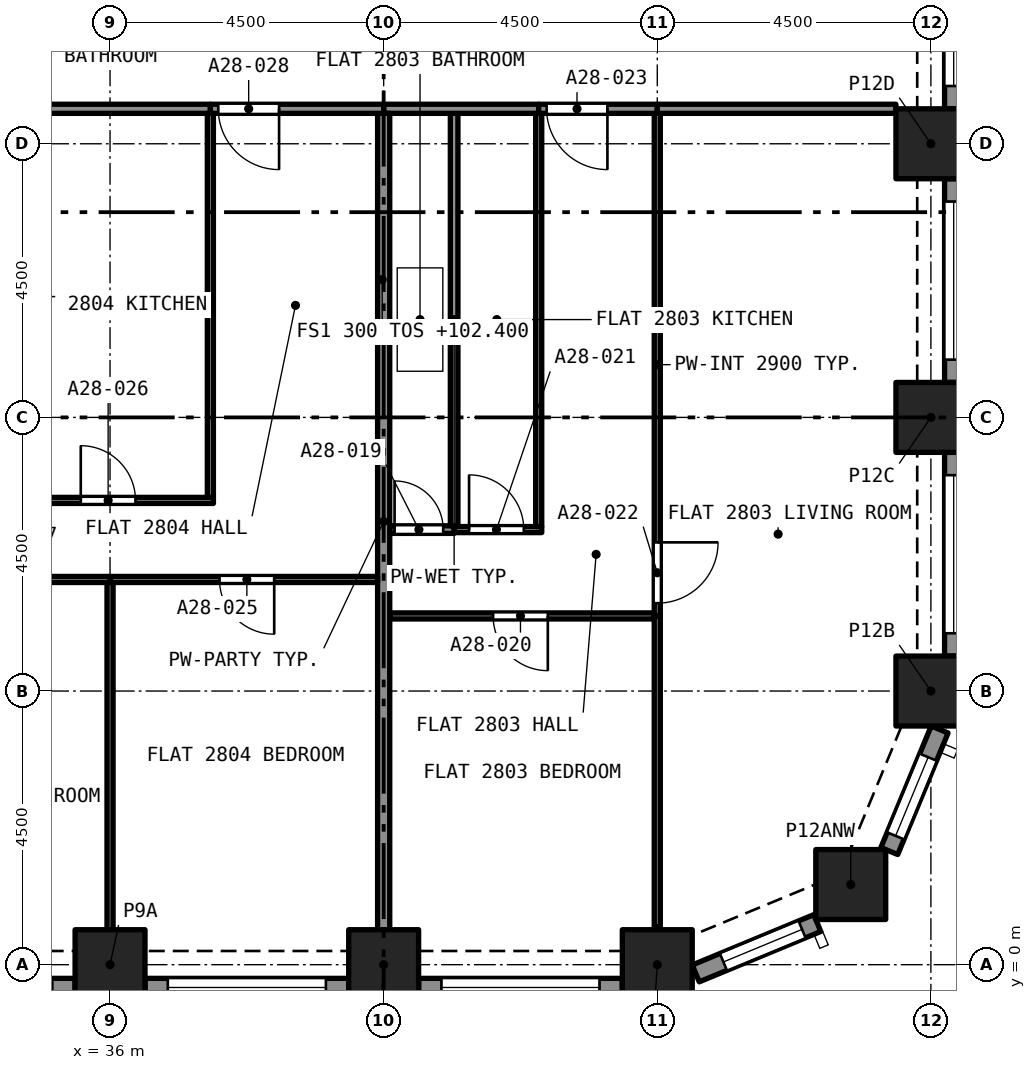
"""IFC4 building model, lengths in metres.
Left out: names, types, materials, properties, quantities, classifications, styles, units other than length and angle.
Written with IfcOpenShell. Run it as: python <this file> out.ifc"""

import sys

from ifc_helpers import new_model, si_unit, direction, frame, frame_2d, origin, origin_2d, place, context, subcontext, project, spatial, rectangle, extrude, element, fill, save


model = new_model("IFC4")
c1 = context("Model", 3, precision=1e-05, world=origin(), true_north=direction((0.0, 1.0)))
c2 = subcontext(c1, "Body", "Model", "MODEL_VIEW")
j1 = project(units=[si_unit("LENGTHUNIT", "METRE"), si_unit("PLANEANGLEUNIT", "RADIAN")], contexts=[c1])
p1 = place(None, origin())
s1 = spatial("IfcSite", under=j1, at=p1, CompositionType="ELEMENT")
p2 = place(p1, origin())
s2 = spatial("IfcBuilding", under=s1, at=p2, CompositionType="ELEMENT")
p3 = place(p2, frame((0.0, 0.0, 102.4)))
s3 = spatial("IfcBuildingStorey", under=s2, at=p3, CompositionType="ELEMENT", Elevation=102.4)
for number, where, z_axis, x_axis in (
    (1, (36.0, 0.0, 0.0), (0.0, 0.0, 1.0), (1.0, 0.0, 0.0)),
    (2, (40.5, 0.0, 0.0), (0.0, 0.0, 1.0), (1.0, 0.0, 0.0)),
    (3, (45.0, 0.0, 0.0), (0.0, 0.0, 1.0), (1.0, 0.0, 0.0)),
    (4, (48.182, 1.318, 0.0), (0.0, 0.0, 1.0), (1.0, 0.0, 0.0)),
    (5, (49.5, 4.5, 0.0), (0.0, 0.0, 1.0), (1.0, 0.0, 0.0)),
    (6, (49.5, 9.0, 0.0), (0.0, 0.0, 1.0), (1.0, 0.0, 0.0)),
    (7, (49.5, 13.5, 0.0), (0.0, 0.0, 1.0), (1.0, 0.0, 0.0)),
):
    element("IfcColumn", number, at=place(p3, frame(where, z_axis=z_axis, x_axis=x_axis)), inside=s3, PredefinedType="COLUMN", context=c2, shape_type="SweptSolid", body=[
        extrude(rectangle(XDim=1.15, YDim=1.15, at=origin_2d()), origin(), (0.0, 0.0, 1.0), 3.2),
    ])
p4 = place(p3, frame((35.425, -0.375, 0.0), z_axis=(0.0, 0.0, 1.0), x_axis=(-1.0, 0.0, 0.0)))
e8 = element("IfcWall", 8, at=p4, inside=s3, PredefinedType="SOLIDWALL", context=c2, shape_type="SweptSolid", body=[
    extrude(rectangle(XDim=3.35, YDim=0.3, at=frame_2d((1.675, 0.0))), origin(), (0.0, 0.0, 1.0), 3.2),
])
p5 = place(p4, frame((0.375, 0.0, 0.45)))
e9 = element("IfcOpeningElement", 9, at=p5, cuts=e8, PredefinedType="OPENING", context=c2, shape_type="SweptSolid", body=[
    extrude(rectangle(XDim=2.6, YDim=1.95, at=frame_2d((1.3, 0.975))), frame((0.0, 0.16, 0.0), z_axis=(0.0, -1.0, 0.0), x_axis=(1.0, 0.0, 0.0)), (0.0, 0.0, 1.0), 0.32),
])
p6 = place(p3, frame((39.925, -0.375, 0.0), z_axis=(0.0, 0.0, 1.0), x_axis=(-1.0, 0.0, 0.0)))
e10 = element("IfcWall", 10, at=p6, inside=s3, PredefinedType="SOLIDWALL", context=c2, shape_type="SweptSolid", body=[
    extrude(rectangle(XDim=3.35, YDim=0.3, at=frame_2d((1.675, 0.0))), origin(), (0.0, 0.0, 1.0), 3.2),
])
p7 = place(p6, frame((0.375, 0.0, 0.45)))
e11 = element("IfcOpeningElement", 11, at=p7, cuts=e10, PredefinedType="OPENING", context=c2, shape_type="SweptSolid", body=[
    extrude(rectangle(XDim=2.6, YDim=1.95, at=frame_2d((1.3, 0.975))), frame((0.0, 0.16, 0.0), z_axis=(0.0, -1.0, 0.0), x_axis=(1.0, 0.0, 0.0)), (0.0, 0.0, 1.0), 0.32),
])
p8 = place(p3, frame((44.425, -0.375, 0.0), z_axis=(0.0, 0.0, 1.0), x_axis=(-1.0, 0.0, 0.0)))
e12 = element("IfcWall", 12, at=p8, inside=s3, PredefinedType="SOLIDWALL", context=c2, shape_type="SweptSolid", body=[
    extrude(rectangle(XDim=3.35, YDim=0.3, at=frame_2d((1.675, 0.0))), origin(), (0.0, 0.0, 1.0), 3.2),
])
p9 = place(p8, frame((0.375, 0.0, 0.45)))
e13 = element("IfcOpeningElement", 13, at=p9, cuts=e12, PredefinedType="OPENING", context=c2, shape_type="SweptSolid", body=[
    extrude(rectangle(XDim=2.6, YDim=1.95, at=frame_2d((1.3, 0.975))), frame((0.0, 0.16, 0.0), z_axis=(0.0, -1.0, 0.0), x_axis=(1.0, 0.0, 0.0)), (0.0, 0.0, 1.0), 0.32),
])
p10 = place(p3, frame((47.631, 0.684, 0.0), z_axis=(0.0, 0.0, 1.0), x_axis=(-0.923862802911, -0.382723818695, 0.0)))
e14 = element("IfcWall", 14, at=p10, inside=s3, PredefinedType="SOLIDWALL", context=c2, shape_type="SweptSolid", body=[
    extrude(rectangle(XDim=2.164, YDim=0.3, at=frame_2d((1.082, 0.0))), origin(), (0.0, 0.0, 1.0), 3.2),
])
p11 = place(p10, frame((0.271, 0.0, 0.45)))
e15 = element("IfcOpeningElement", 15, at=p11, cuts=e14, PredefinedType="OPENING", context=c2, shape_type="SweptSolid", body=[
    extrude(rectangle(XDim=1.4, YDim=1.95, at=frame_2d((0.7, 0.975))), frame((0.0, 0.16, 0.0), z_axis=(0.0, -1.0, 0.0), x_axis=(1.0, 0.0, 0.0)), (0.0, 0.0, 1.0), 0.32),
])
p12 = place(p3, frame((49.644, 3.868, 0.0), z_axis=(0.0, 0.0, 1.0), x_axis=(-0.382723818695, -0.923862802911, 0.0)))
e16 = element("IfcWall", 16, at=p12, inside=s3, PredefinedType="SOLIDWALL", context=c2, shape_type="SweptSolid", body=[
    extrude(rectangle(XDim=2.164, YDim=0.3, at=frame_2d((1.082, 0.0))), origin(), (0.0, 0.0, 1.0), 3.2),
])
p13 = place(p12, frame((0.493, 0.0, 0.45)))
e17 = element("IfcOpeningElement", 17, at=p13, cuts=e16, PredefinedType="OPENING", context=c2, shape_type="SweptSolid", body=[
    extrude(rectangle(XDim=1.4, YDim=1.95, at=frame_2d((0.7, 0.975))), frame((0.0, 0.16, 0.0), z_axis=(0.0, -1.0, 0.0), x_axis=(1.0, 0.0, 0.0)), (0.0, 0.0, 1.0), 0.32),
])
p14 = place(p3, frame((49.875, 8.425, 0.0), z_axis=(0.0, 0.0, 1.0), x_axis=(0.0, -1.0, 0.0)))
e18 = element("IfcWall", 18, at=p14, inside=s3, PredefinedType="SOLIDWALL", context=c2, shape_type="SweptSolid", body=[
    extrude(rectangle(XDim=3.35, YDim=0.3, at=frame_2d((1.675, 0.0))), origin(), (0.0, 0.0, 1.0), 3.2),
])
p15 = place(p14, frame((0.375, 0.0, 0.45)))
e19 = element("IfcOpeningElement", 19, at=p15, cuts=e18, PredefinedType="OPENING", context=c2, shape_type="SweptSolid", body=[
    extrude(rectangle(XDim=2.6, YDim=1.95, at=frame_2d((1.3, 0.975))), frame((0.0, 0.16, 0.0), z_axis=(0.0, -1.0, 0.0), x_axis=(1.0, 0.0, 0.0)), (0.0, 0.0, 1.0), 0.32),
])
p16 = place(p3, frame((49.875, 12.925, 0.0), z_axis=(0.0, 0.0, 1.0), x_axis=(0.0, -1.0, 0.0)))
e20 = element("IfcWall", 20, at=p16, inside=s3, PredefinedType="SOLIDWALL", context=c2, shape_type="SweptSolid", body=[
    extrude(rectangle(XDim=3.35, YDim=0.3, at=frame_2d((1.675, 0.0))), origin(), (0.0, 0.0, 1.0), 3.2),
])
p17 = place(p16, frame((0.375, 0.0, 0.45)))
e21 = element("IfcOpeningElement", 21, at=p17, cuts=e20, PredefinedType="OPENING", context=c2, shape_type="SweptSolid", body=[
    extrude(rectangle(XDim=2.6, YDim=1.95, at=frame_2d((1.3, 0.975))), frame((0.0, 0.16, 0.0), z_axis=(0.0, -1.0, 0.0), x_axis=(1.0, 0.0, 0.0)), (0.0, 0.0, 1.0), 0.32),
])
p18 = place(p3, frame((49.875, 17.425, 0.0), z_axis=(0.0, 0.0, 1.0), x_axis=(0.0, -1.0, 0.0)))
e22 = element("IfcWall", 22, at=p18, inside=s3, PredefinedType="SOLIDWALL", context=c2, shape_type="SweptSolid", body=[
    extrude(rectangle(XDim=3.35, YDim=0.3, at=frame_2d((1.675, 0.0))), origin(), (0.0, 0.0, 1.0), 3.2),
])
p19 = place(p18, frame((0.375, 0.0, 0.45)))
e23 = element("IfcOpeningElement", 23, at=p19, cuts=e22, PredefinedType="OPENING", context=c2, shape_type="SweptSolid", body=[
    extrude(rectangle(XDim=2.6, YDim=1.95, at=frame_2d((1.3, 0.975))), frame((0.0, 0.16, 0.0), z_axis=(0.0, -1.0, 0.0), x_axis=(1.0, 0.0, 0.0)), (0.0, 0.0, 1.0), 0.32),
])
p20 = place(p3, frame((40.6, 7.155, 0.0), z_axis=(0.0, 0.0, 1.0), x_axis=(1.0, 0.0, 0.0)))
e24 = element("IfcWall", 24, at=p20, inside=s3, PredefinedType="PARTITIONING", context=c2, shape_type="SweptSolid", body=[
    extrude(rectangle(XDim=1.059, YDim=0.125, at=frame_2d((0.53, 0.0))), origin(), (0.0, 0.0, 1.0), 2.9),
])
p21 = place(p20, frame((0.08, 0.0, 0.0)))
e25 = element("IfcOpeningElement", 25, at=p21, cuts=e24, PredefinedType="OPENING", context=c2, shape_type="SweptSolid", body=[
    extrude(rectangle(XDim=0.8, YDim=2.1, at=frame_2d((0.4, 1.05))), frame((0.0, 0.073, 0.0), z_axis=(0.0, -1.0, 0.0), x_axis=(1.0, 0.0, 0.0)), (0.0, 0.0, 1.0), 0.145),
])
p22 = place(p3, frame((41.659, 7.218, 0.0), z_axis=(0.0, 0.0, 1.0), x_axis=(0.0, 1.0, 0.0)))
e26 = element("IfcWall", 26, at=p22, inside=s3, PredefinedType="PARTITIONING", context=c2, shape_type="SweptSolid", body=[
    extrude(rectangle(XDim=6.782, YDim=0.125, at=frame_2d((3.391, 0.0))), origin(), (0.0, 0.0, 1.0), 2.9),
])
p23 = place(p3, frame((40.5, 14.075, 0.0), z_axis=(0.0, 0.0, 1.0), x_axis=(1.0, 0.0, 0.0)))
e27 = element("IfcWall", 27, at=p23, inside=s3, PredefinedType="PARTITIONING", context=c2, shape_type="SweptSolid", body=[
    extrude(rectangle(XDim=2.55, YDim=0.15, at=frame_2d((1.275, 0.0))), origin(), (0.0, 0.0, 1.0), 2.9),
])
p24 = place(p3, frame((44.95, 5.735, 0.0), z_axis=(0.0, 0.0, 1.0), x_axis=(-1.0, 0.0, 0.0)))
e28 = element("IfcWall", 28, at=p24, inside=s3, PredefinedType="PARTITIONING", context=c2, shape_type="SweptSolid", body=[
    extrude(rectangle(XDim=4.35, YDim=0.1, at=frame_2d((2.175, 0.0))), origin(), (0.0, 0.0, 1.0), 2.9),
])
p25 = place(p24, frame((1.75, 0.0, 0.0)))
e29 = element("IfcOpeningElement", 29, at=p25, cuts=e28, PredefinedType="OPENING", context=c2, shape_type="SweptSolid", body=[
    extrude(rectangle(XDim=0.9, YDim=2.1, at=frame_2d((0.45, 1.05))), frame((0.0, 0.06, 0.0), z_axis=(0.0, -1.0, 0.0), x_axis=(1.0, 0.0, 0.0)), (0.0, 0.0, 1.0), 0.12),
])
p26 = place(p3, frame((45.0, 0.622, 0.0), z_axis=(0.0, 0.0, 1.0), x_axis=(0.0, 1.0, 0.0)))
e30 = element("IfcWall", 30, at=p26, inside=s3, PredefinedType="PARTITIONING", context=c2, shape_type="SweptSolid", body=[
    extrude(rectangle(XDim=5.113, YDim=0.1, at=frame_2d((2.556, 0.0))), origin(), (0.0, 0.0, 1.0), 2.9),
])
p27 = place(p3, frame((40.5, 0.575, 0.0), z_axis=(0.0, 0.0, 1.0), x_axis=(0.0, 1.0, 0.0)))
e31 = element("IfcWall", 31, at=p27, inside=s3, PredefinedType="PARTITIONING", context=c2, shape_type="SweptSolid", body=[
    extrude(rectangle(XDim=13.425, YDim=0.2, at=frame_2d((6.712, 0.0))), origin(), (0.0, 0.0, 1.0), 2.9),
])
p28 = place(p3, frame((41.659, 7.155, 0.0), z_axis=(0.0, 0.0, 1.0), x_axis=(1.0, 0.0, 0.0)))
e32 = element("IfcWall", 32, at=p28, inside=s3, PredefinedType="PARTITIONING", context=c2, shape_type="SweptSolid", body=[
    extrude(rectangle(XDim=1.441, YDim=0.1, at=frame_2d((0.72, 0.0))), origin(), (0.0, 0.0, 1.0), 2.9),
])
p29 = place(p28, frame((0.246, 0.0, 0.0)))
e33 = element("IfcOpeningElement", 33, at=p29, cuts=e32, PredefinedType="OPENING", context=c2, shape_type="SweptSolid", body=[
    extrude(rectangle(XDim=0.9, YDim=2.1, at=frame_2d((0.45, 1.05))), frame((0.0, 0.06, 0.0), z_axis=(0.0, -1.0, 0.0), x_axis=(1.0, 0.0, 0.0)), (0.0, 0.0, 1.0), 0.12),
])
p30 = place(p3, frame((43.05, 7.205, 0.0), z_axis=(0.0, 0.0, 1.0), x_axis=(0.0, 1.0, 0.0)))
e34 = element("IfcWall", 34, at=p30, inside=s3, PredefinedType="PARTITIONING", context=c2, shape_type="SweptSolid", body=[
    extrude(rectangle(XDim=6.795, YDim=0.1, at=frame_2d((3.397, 0.0))), origin(), (0.0, 0.0, 1.0), 2.9),
])
p31 = place(p3, frame((45.0, 14.0, 0.0), z_axis=(0.0, 0.0, 1.0), x_axis=(0.0, -1.0, 0.0)))
e35 = element("IfcWall", 35, at=p31, inside=s3, PredefinedType="PARTITIONING", context=c2, shape_type="SweptSolid", body=[
    extrude(rectangle(XDim=8.265, YDim=0.1, at=frame_2d((4.132, 0.0))), origin(), (0.0, 0.0, 1.0), 2.9),
])
p32 = place(p31, frame((7.055, 0.0, 0.0)))
e36 = element("IfcOpeningElement", 36, at=p32, cuts=e35, PredefinedType="OPENING", context=c2, shape_type="SweptSolid", body=[
    extrude(rectangle(XDim=1.0, YDim=2.1, at=frame_2d((0.5, 1.05))), frame((0.0, 0.06, 0.0), z_axis=(0.0, -1.0, 0.0), x_axis=(1.0, 0.0, 0.0)), (0.0, 0.0, 1.0), 0.12),
])
p33 = place(p3, frame((45.0, 14.075, 0.0), z_axis=(0.0, 0.0, 1.0), x_axis=(-1.0, 0.0, 0.0)))
e37 = element("IfcWall", 37, at=p33, inside=s3, PredefinedType="PARTITIONING", context=c2, shape_type="SweptSolid", body=[
    extrude(rectangle(XDim=1.95, YDim=0.15, at=frame_2d((0.975, 0.0))), origin(), (0.0, 0.0, 1.0), 2.9),
])
p34 = place(p33, frame((0.82, 0.0, 0.0)))
e38 = element("IfcOpeningElement", 38, at=p34, cuts=e37, PredefinedType="OPENING", context=c2, shape_type="SweptSolid", body=[
    extrude(rectangle(XDim=1.0, YDim=2.1, at=frame_2d((0.5, 1.05))), frame((0.0, 0.085, 0.0), z_axis=(0.0, -1.0, 0.0), x_axis=(1.0, 0.0, 0.0)), (0.0, 0.0, 1.0), 0.17),
])
p35 = place(p3, frame((45.0, 14.075, 0.0), z_axis=(0.0, 0.0, 1.0), x_axis=(1.0, 0.0, 0.0)))
e39 = element("IfcWall", 39, at=p35, inside=s3, PredefinedType="PARTITIONING", context=c2, shape_type="SweptSolid", body=[
    extrude(rectangle(XDim=3.925, YDim=0.15, at=frame_2d((1.962, 0.0))), origin(), (0.0, 0.0, 1.0), 2.9),
])
p36 = place(p3, frame((32.075, 14.075, 0.0), z_axis=(0.0, 0.0, 1.0), x_axis=(1.0, 0.0, 0.0)))
e40 = element("IfcWall", 40, at=p36, inside=s3, PredefinedType="PARTITIONING", context=c2, shape_type="SweptSolid", body=[
    extrude(rectangle(XDim=5.575, YDim=0.15, at=frame_2d((2.788, 0.0))), origin(), (0.0, 0.0, 1.0), 2.9),
])
p37 = place(p3, frame((40.4, 6.335, 0.0), z_axis=(0.0, 0.0, 1.0), x_axis=(-1.0, 0.0, 0.0)))
e41 = element("IfcWall", 41, at=p37, inside=s3, PredefinedType="PARTITIONING", context=c2, shape_type="SweptSolid", body=[
    extrude(rectangle(XDim=4.4, YDim=0.1, at=frame_2d((2.2, 0.0))), origin(), (0.0, 0.0, 1.0), 2.9),
])
p38 = place(p37, frame((1.7, 0.0, 0.0)))
e42 = element("IfcOpeningElement", 42, at=p38, cuts=e41, PredefinedType="OPENING", context=c2, shape_type="SweptSolid", body=[
    extrude(rectangle(XDim=0.9, YDim=2.1, at=frame_2d((0.45, 1.05))), frame((0.0, 0.06, 0.0), z_axis=(0.0, -1.0, 0.0), x_axis=(1.0, 0.0, 0.0)), (0.0, 0.0, 1.0), 0.12),
])
p39 = place(p3, frame((36.0, 0.575, 0.0), z_axis=(0.0, 0.0, 1.0), x_axis=(0.0, 1.0, 0.0)))
e43 = element("IfcWall", 43, at=p39, inside=s3, PredefinedType="PARTITIONING", context=c2, shape_type="SweptSolid", body=[
    extrude(rectangle(XDim=5.71, YDim=0.1, at=frame_2d((2.855, 0.0))), origin(), (0.0, 0.0, 1.0), 2.9),
])
p40 = place(p3, frame((34.287, 7.635, 0.0), z_axis=(0.0, 0.0, 1.0), x_axis=(1.0, 0.0, 0.0)))
e44 = element("IfcWall", 44, at=p40, inside=s3, PredefinedType="PARTITIONING", context=c2, shape_type="SweptSolid", body=[
    extrude(rectangle(XDim=3.413, YDim=0.1, at=frame_2d((1.707, 0.0))), origin(), (0.0, 0.0, 1.0), 2.9),
])
p41 = place(p40, frame((1.231, 0.0, 0.0)))
e45 = element("IfcOpeningElement", 45, at=p41, cuts=e44, PredefinedType="OPENING", context=c2, shape_type="SweptSolid", body=[
    extrude(rectangle(XDim=0.9, YDim=2.1, at=frame_2d((0.45, 1.05))), frame((0.0, 0.06, 0.0), z_axis=(0.0, -1.0, 0.0), x_axis=(1.0, 0.0, 0.0)), (0.0, 0.0, 1.0), 0.12),
])
p42 = place(p3, frame((37.65, 7.685, 0.0), z_axis=(0.0, 0.0, 1.0), x_axis=(0.0, 1.0, 0.0)))
e46 = element("IfcWall", 46, at=p42, inside=s3, PredefinedType="PARTITIONING", context=c2, shape_type="SweptSolid", body=[
    extrude(rectangle(XDim=6.315, YDim=0.1, at=frame_2d((3.157, 0.0))), origin(), (0.0, 0.0, 1.0), 2.9),
])
p43 = place(p3, frame((36.0, 6.335, 0.0), z_axis=(0.0, 0.0, 1.0), x_axis=(-1.0, 0.0, 0.0)))
e47 = element("IfcWall", 47, at=p43, inside=s3, PredefinedType="PARTITIONING", context=c2, shape_type="SweptSolid", body=[
    extrude(rectangle(XDim=4.375, YDim=0.1, at=frame_2d((2.188, 0.0))), origin(), (0.0, 0.0, 1.0), 2.9),
])
p44 = place(p43, frame((1.75, 0.0, 0.0)))
e48 = element("IfcOpeningElement", 48, at=p44, cuts=e47, PredefinedType="OPENING", context=c2, shape_type="SweptSolid", body=[
    extrude(rectangle(XDim=1.0, YDim=2.1, at=frame_2d((0.5, 1.05))), frame((0.0, 0.06, 0.0), z_axis=(0.0, -1.0, 0.0), x_axis=(1.0, 0.0, 0.0)), (0.0, 0.0, 1.0), 0.12),
])
p45 = place(p3, frame((40.5, 14.075, 0.0), z_axis=(0.0, 0.0, 1.0), x_axis=(-1.0, 0.0, 0.0)))
e49 = element("IfcWall", 49, at=p45, inside=s3, PredefinedType="PARTITIONING", context=c2, shape_type="SweptSolid", body=[
    extrude(rectangle(XDim=2.85, YDim=0.15, at=frame_2d((1.425, 0.0))), origin(), (0.0, 0.0, 1.0), 2.9),
])
p46 = place(p45, frame((1.72, 0.0, 0.0)))
e50 = element("IfcOpeningElement", 50, at=p46, cuts=e49, PredefinedType="OPENING", context=c2, shape_type="SweptSolid", body=[
    extrude(rectangle(XDim=1.0, YDim=2.1, at=frame_2d((0.5, 1.05))), frame((0.0, 0.085, 0.0), z_axis=(0.0, -1.0, 0.0), x_axis=(1.0, 0.0, 0.0)), (0.0, 0.0, 1.0), 0.17),
])
p47 = place(p7, origin())
e51 = element("IfcWindow", 51, at=p47, inside=s3, PartitioningType="SINGLE_PANEL", PredefinedType="WINDOW", context=c2, shape_type="SweptSolid", body=[
    extrude(rectangle(XDim=2.6, YDim=1.95, at=frame_2d((1.3, 0.975))), frame((0.0, 0.03, 0.0), z_axis=(0.0, -1.0, 0.0), x_axis=(1.0, 0.0, 0.0)), (0.0, 0.0, 1.0), 0.06),
])
fill(e11, e51)
p48 = place(p9, origin())
e52 = element("IfcWindow", 52, at=p48, inside=s3, PartitioningType="SINGLE_PANEL", PredefinedType="WINDOW", context=c2, shape_type="SweptSolid", body=[
    extrude(rectangle(XDim=2.6, YDim=1.95, at=frame_2d((1.3, 0.975))), frame((0.0, 0.03, 0.0), z_axis=(0.0, -1.0, 0.0), x_axis=(1.0, 0.0, 0.0)), (0.0, 0.0, 1.0), 0.06),
])
fill(e13, e52)
p49 = place(p11, origin())
e53 = element("IfcWindow", 53, at=p49, inside=s3, PartitioningType="SINGLE_PANEL", PredefinedType="WINDOW", context=c2, shape_type="SweptSolid", body=[
    extrude(rectangle(XDim=1.4, YDim=1.95, at=frame_2d((0.7, 0.975))), frame((0.0, 0.03, 0.0), z_axis=(0.0, -1.0, 0.0), x_axis=(1.0, 0.0, 0.0)), (0.0, 0.0, 1.0), 0.06),
])
fill(e15, e53)
p50 = place(p13, origin())
e54 = element("IfcWindow", 54, at=p50, inside=s3, PartitioningType="SINGLE_PANEL", PredefinedType="WINDOW", context=c2, shape_type="SweptSolid", body=[
    extrude(rectangle(XDim=1.4, YDim=1.95, at=frame_2d((0.7, 0.975))), frame((0.0, 0.03, 0.0), z_axis=(0.0, -1.0, 0.0), x_axis=(1.0, 0.0, 0.0)), (0.0, 0.0, 1.0), 0.06),
])
fill(e17, e54)
p51 = place(p15, origin())
e55 = element("IfcWindow", 55, at=p51, inside=s3, PartitioningType="SINGLE_PANEL", PredefinedType="WINDOW", context=c2, shape_type="SweptSolid", body=[
    extrude(rectangle(XDim=2.6, YDim=1.95, at=frame_2d((1.3, 0.975))), frame((0.0, 0.03, 0.0), z_axis=(0.0, -1.0, 0.0), x_axis=(1.0, 0.0, 0.0)), (0.0, 0.0, 1.0), 0.06),
])
fill(e19, e55)
p52 = place(p17, origin())
e56 = element("IfcWindow", 56, at=p52, inside=s3, PartitioningType="SINGLE_PANEL", PredefinedType="WINDOW", context=c2, shape_type="SweptSolid", body=[
    extrude(rectangle(XDim=2.6, YDim=1.95, at=frame_2d((1.3, 0.975))), frame((0.0, 0.03, 0.0), z_axis=(0.0, -1.0, 0.0), x_axis=(1.0, 0.0, 0.0)), (0.0, 0.0, 1.0), 0.06),
])
fill(e21, e56)
p53 = place(p19, origin())
e57 = element("IfcWindow", 57, at=p53, inside=s3, PartitioningType="SINGLE_PANEL", PredefinedType="WINDOW", context=c2, shape_type="SweptSolid", body=[
    extrude(rectangle(XDim=2.6, YDim=1.95, at=frame_2d((1.3, 0.975))), frame((0.0, 0.03, 0.0), z_axis=(0.0, -1.0, 0.0), x_axis=(1.0, 0.0, 0.0)), (0.0, 0.0, 1.0), 0.06),
])
fill(e23, e57)
p54 = place(p21, origin())
e58 = element("IfcDoor", 58, at=p54, inside=s3, OperationType="SINGLE_SWING_LEFT", PredefinedType="DOOR", context=c2, shape_type="SweptSolid", body=[
    extrude(rectangle(XDim=0.8, YDim=2.1, at=frame_2d((0.4, 1.05))), frame((0.0, 0.025, 0.0), z_axis=(0.0, -1.0, 0.0), x_axis=(1.0, 0.0, 0.0)), (0.0, 0.0, 1.0), 0.05),
])
fill(e25, e58)
p55 = place(p25, origin())
e59 = element("IfcDoor", 59, at=p55, inside=s3, OperationType="SINGLE_SWING_RIGHT", PredefinedType="DOOR", context=c2, shape_type="SweptSolid", body=[
    extrude(rectangle(XDim=0.9, YDim=2.1, at=frame_2d((0.45, 1.05))), frame((0.0, 0.025, 0.0), z_axis=(0.0, -1.0, 0.0), x_axis=(1.0, 0.0, 0.0)), (0.0, 0.0, 1.0), 0.05),
])
fill(e29, e59)
p56 = place(p29, origin())
e60 = element("IfcDoor", 60, at=p56, inside=s3, OperationType="SINGLE_SWING_LEFT", PredefinedType="DOOR", context=c2, shape_type="SweptSolid", body=[
    extrude(rectangle(XDim=0.9, YDim=2.1, at=frame_2d((0.45, 1.05))), frame((0.0, 0.025, 0.0), z_axis=(0.0, -1.0, 0.0), x_axis=(1.0, 0.0, 0.0)), (0.0, 0.0, 1.0), 0.05),
])
fill(e33, e60)
p57 = place(p32, origin())
e61 = element("IfcDoor", 61, at=p57, inside=s3, OperationType="SINGLE_SWING_RIGHT", PredefinedType="DOOR", context=c2, shape_type="SweptSolid", body=[
    extrude(rectangle(XDim=1.0, YDim=2.1, at=frame_2d((0.5, 1.05))), frame((0.0, 0.025, 0.0), z_axis=(0.0, -1.0, 0.0), x_axis=(1.0, 0.0, 0.0)), (0.0, 0.0, 1.0), 0.05),
])
fill(e36, e61)
p58 = place(p34, origin())
e62 = element("IfcDoor", 62, at=p58, inside=s3, OperationType="SINGLE_SWING_RIGHT", PredefinedType="DOOR", context=c2, shape_type="SweptSolid", body=[
    extrude(rectangle(XDim=1.0, YDim=2.1, at=frame_2d((0.5, 1.05))), frame((0.0, 0.025, 0.0), z_axis=(0.0, -1.0, 0.0), x_axis=(1.0, 0.0, 0.0)), (0.0, 0.0, 1.0), 0.05),
])
fill(e38, e62)
p59 = place(p38, origin())
e63 = element("IfcDoor", 63, at=p59, inside=s3, OperationType="SINGLE_SWING_LEFT", PredefinedType="DOOR", context=c2, shape_type="SweptSolid", body=[
    extrude(rectangle(XDim=0.9, YDim=2.1, at=frame_2d((0.45, 1.05))), frame((0.0, 0.025, 0.0), z_axis=(0.0, -1.0, 0.0), x_axis=(1.0, 0.0, 0.0)), (0.0, 0.0, 1.0), 0.05),
])
fill(e42, e63)
p60 = place(p41, origin())
e64 = element("IfcDoor", 64, at=p60, inside=s3, OperationType="SINGLE_SWING_LEFT", PredefinedType="DOOR", context=c2, shape_type="SweptSolid", body=[
    extrude(rectangle(XDim=0.9, YDim=2.1, at=frame_2d((0.45, 1.05))), frame((0.0, 0.025, 0.0), z_axis=(0.0, -1.0, 0.0), x_axis=(1.0, 0.0, 0.0)), (0.0, 0.0, 1.0), 0.05),
])
fill(e45, e64)
p61 = place(p46, origin())
e65 = element("IfcDoor", 65, at=p61, inside=s3, OperationType="SINGLE_SWING_RIGHT", PredefinedType="DOOR", context=c2, shape_type="SweptSolid", body=[
    extrude(rectangle(XDim=1.0, YDim=2.1, at=frame_2d((0.5, 1.05))), frame((0.0, 0.025, 0.0), z_axis=(0.0, -1.0, 0.0), x_axis=(1.0, 0.0, 0.0)), (0.0, 0.0, 1.0), 0.05),
])
fill(e50, e65)
save(model, sys.argv[1])
